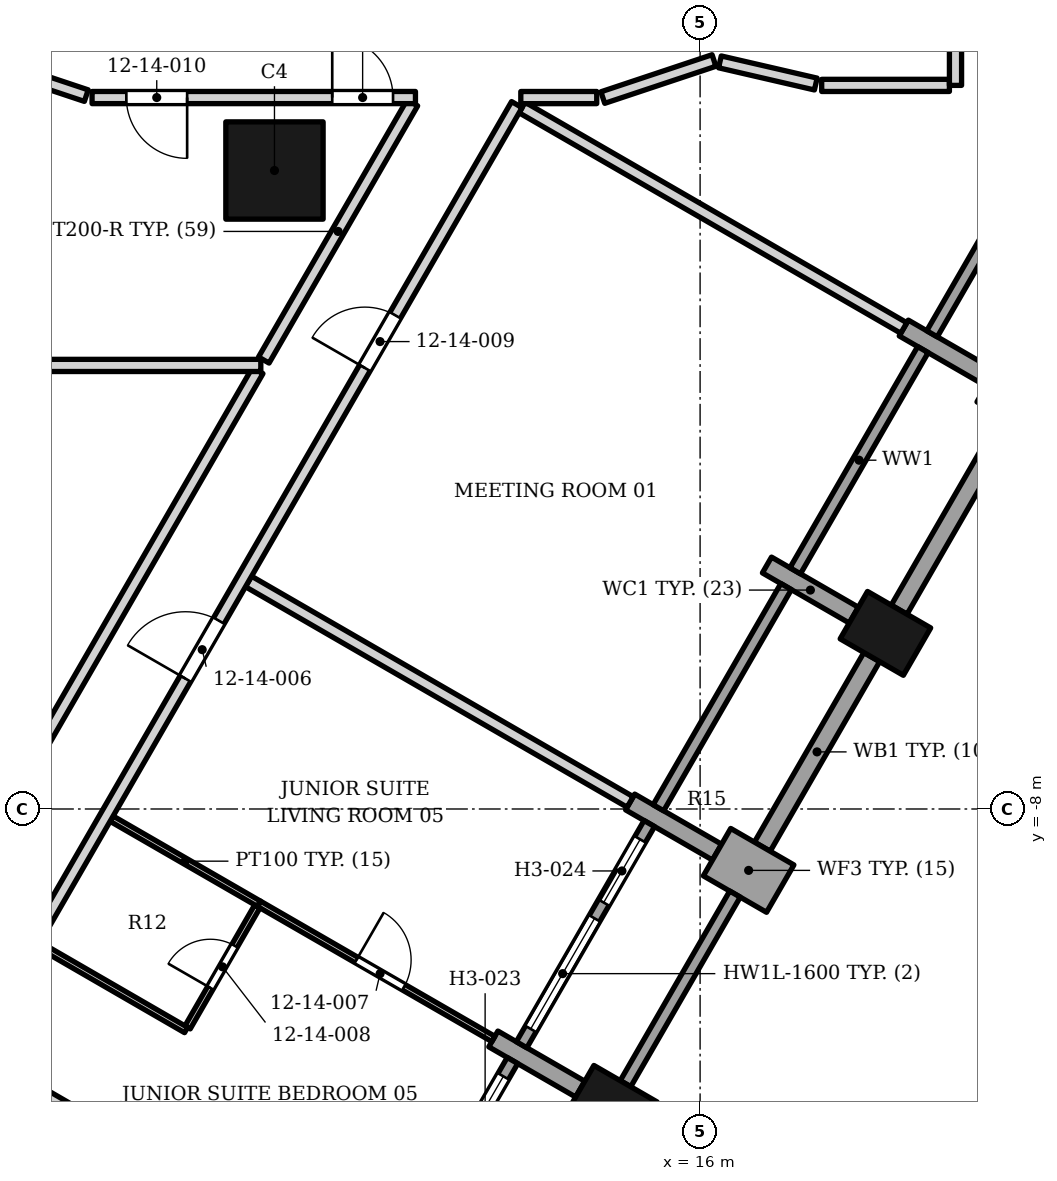
"""IFC4 building model, lengths in metres.
Left out: names, types, materials, properties, quantities, classifications, styles, units other than length and angle.
Written with IfcOpenShell. Run it as: python <this file> out.ifc"""

import sys

from ifc_helpers import new_model, si_unit, direction, frame, frame_2d, origin, origin_2d, place, context, subcontext, project, spatial, rectangle, extrude, element, fill, save


model = new_model("IFC4")
c1 = context("Model", 3, precision=1e-05, world=origin(), true_north=direction((0.0, 1.0)))
c2 = subcontext(c1, "Body", "Model", "MODEL_VIEW")
j1 = project(units=[si_unit("LENGTHUNIT", "METRE"), si_unit("PLANEANGLEUNIT", "RADIAN")], contexts=[c1])
p1 = place(None, origin())
s1 = spatial("IfcSite", under=j1, at=p1, CompositionType="ELEMENT")
p2 = place(p1, origin())
s2 = spatial("IfcBuilding", under=s1, at=p2, CompositionType="ELEMENT")
p3 = place(p2, frame((0.0, 0.0, 66.4)))
s3 = spatial("IfcBuildingStorey", under=s2, at=p3, CompositionType="ELEMENT", Elevation=66.4)
p4 = place(p3, frame((9.0, 2.5, 0.0), z_axis=(0.0, 0.0, 1.0), x_axis=(1.0, 0.0, 0.0)))
e1 = element("IfcColumn", 1, at=p4, inside=s3, PredefinedType="COLUMN", context=c2, shape_type="SweptSolid", body=[
    extrude(rectangle(XDim=1.6, YDim=1.6, at=origin_2d()), origin(), (0.0, 0.0, 1.0), 3.4),
])
for number, where, z_axis, x_axis in (
    (2, (14.548, -12.907, 0.0), (0.0, 0.0, 1.0), (0.5, 0.866, 0.0)),
    (3, (19.048, -5.112, 0.0), (0.0, 0.0, 1.0), (0.5, 0.866, 0.0)),
):
    element("IfcColumn", number, at=place(p3, frame(where, z_axis=z_axis, x_axis=x_axis)), inside=s3, PredefinedType="COLUMN", context=c2, shape_type="SweptSolid", body=[
        extrude(rectangle(XDim=0.9, YDim=1.2, at=origin_2d()), origin(), (0.0, 0.0, 1.0), 3.4),
    ])
p5 = place(p3, frame((14.029, -12.607, 0.0), z_axis=(0.0, 0.0, 1.0), x_axis=(-0.866003217194, 0.500038426333, 0.0)))
e4 = element("IfcWall", 4, at=p5, inside=s3, PredefinedType="SOLIDWALL", context=c2, shape_type="SweptSolid", body=[
    extrude(rectangle(XDim=1.65, YDim=0.3, at=frame_2d((0.825, 0.0))), origin(), (0.0, 0.0, 1.0), 2.302),
])
p6 = place(p3, frame((16.279, -8.709, 0.0), z_axis=(0.0, 0.0, 1.0), x_axis=(0.865955154139, -0.50012165622, 0.0)))
e5 = element("IfcWall", 5, at=p6, inside=s3, PredefinedType="SOLIDWALL", context=c2, shape_type="SweptSolid", body=[
    extrude(rectangle(XDim=1.2, YDim=0.9, at=frame_2d((0.6, 0.0))), origin(), (0.0, 0.0, 1.0), 2.63),
])
p7 = place(p3, frame((16.279, -8.709, 0.0), z_axis=(0.0, 0.0, 1.0), x_axis=(-0.866040211805, 0.499974350878, 0.0)))
e6 = element("IfcWall", 6, at=p7, inside=s3, PredefinedType="SOLIDWALL", context=c2, shape_type="SweptSolid", body=[
    extrude(rectangle(XDim=1.65, YDim=0.3, at=frame_2d((0.825, 0.0))), origin(), (0.0, 0.0, 1.0), 2.65),
])
p8 = place(p3, frame((17.1, -3.988, 0.0), z_axis=(0.0, 0.0, 1.0), x_axis=(0.866030301974, -0.499991515992, 0.0)))
e7 = element("IfcWall", 7, at=p8, inside=s3, PredefinedType="SOLIDWALL", context=c2, shape_type="SweptSolid", body=[
    extrude(rectangle(XDim=1.649, YDim=0.3, at=frame_2d((0.825, 0.0))), origin(), (0.0, 0.0, 1.0), 2.65),
])
p9 = place(p3, frame((21.818, -1.515, 0.0), z_axis=(0.0, 0.0, 1.0), x_axis=(-0.865955154139, 0.50012165622, 0.0)))
e8 = element("IfcWall", 8, at=p9, inside=s3, PredefinedType="SOLIDWALL", context=c2, shape_type="SweptSolid", body=[
    extrude(rectangle(XDim=1.2, YDim=0.9, at=frame_2d((0.6, 0.0))), origin(), (0.0, 0.0, 1.0), 2.63),
])
p10 = place(p3, frame((19.35, -0.09, 0.0), z_axis=(0.0, 0.0, 1.0), x_axis=(0.866040211805, -0.499974350878, 0.0)))
e9 = element("IfcWall", 9, at=p10, inside=s3, PredefinedType="SOLIDWALL", context=c2, shape_type="SweptSolid", body=[
    extrude(rectangle(XDim=1.65, YDim=0.3, at=frame_2d((0.825, 0.0))), origin(), (0.0, 0.0, 1.0), 2.65),
])
p11 = place(p3, frame((10.814, -15.774, 0.0), z_axis=(0.0, 0.0, 1.0), x_axis=(0.500002543286, 0.866023935413, 0.0)))
e10 = element("IfcWall", 10, at=p11, inside=s3, PredefinedType="ELEMENTEDWALL", context=c2, shape_type="SweptSolid", body=[
    extrude(rectangle(XDim=4.2, YDim=0.2, at=frame_2d((2.1, 0.0))), origin(), (0.0, 0.0, 1.0), 2.302),
])
p12 = place(p11, frame((0.3, 0.0, 0.6)))
e11 = element("IfcOpeningElement", 11, at=p12, cuts=e10, PredefinedType="OPENING", context=c2, shape_type="SweptSolid", body=[
    extrude(rectangle(XDim=2.1, YDim=1.6, at=frame_2d((1.05, 0.8))), frame((0.0, 0.11, 0.0), z_axis=(0.0, -1.0, 0.0), x_axis=(1.0, 0.0, 0.0)), (0.0, 0.0, 1.0), 0.22),
])
p13 = place(p11, frame((2.7, 0.0, 0.0)))
e12 = element("IfcOpeningElement", 12, at=p13, cuts=e10, PredefinedType="OPENING", context=c2, shape_type="SweptSolid", body=[
    extrude(rectangle(XDim=1.2, YDim=2.2, at=frame_2d((0.6, 1.1))), frame((0.0, 0.11, 0.0), z_axis=(0.0, -1.0, 0.0), x_axis=(1.0, 0.0, 0.0)), (0.0, 0.0, 1.0), 0.22),
])
p14 = place(p3, frame((14.773, -12.517, 0.0), z_axis=(0.0, 0.0, 1.0), x_axis=(0.499931829785, 0.866064758299, 0.0)))
e13 = element("IfcWall", 13, at=p14, inside=s3, PredefinedType="SOLIDWALL", context=c2, shape_type="SweptSolid", body=[
    extrude(rectangle(XDim=3.6, YDim=0.2, at=frame_2d((1.8, 0.0))), origin(), (0.0, 0.0, 1.0), 2.302),
])
p15 = place(p3, frame((13.064, -11.877, 0.0), z_axis=(0.0, 0.0, 1.0), x_axis=(0.500027713859, 0.866009402589, 0.0)))
e14 = element("IfcWall", 14, at=p15, inside=s3, PredefinedType="ELEMENTEDWALL", context=c2, shape_type="SweptSolid", body=[
    extrude(rectangle(XDim=4.2, YDim=0.2, at=frame_2d((2.1, 0.0))), origin(), (0.0, 0.0, 1.0), 2.302),
])
p16 = place(p15, frame((0.3, 0.0, 0.6)))
e15 = element("IfcOpeningElement", 15, at=p16, cuts=e14, PredefinedType="OPENING", context=c2, shape_type="SweptSolid", body=[
    extrude(rectangle(XDim=2.1, YDim=1.6, at=frame_2d((1.05, 0.8))), frame((0.0, 0.11, 0.0), z_axis=(0.0, -1.0, 0.0), x_axis=(1.0, 0.0, 0.0)), (0.0, 0.0, 1.0), 0.22),
])
p17 = place(p15, frame((2.7, 0.0, 0.0)))
e16 = element("IfcOpeningElement", 16, at=p17, cuts=e14, PredefinedType="OPENING", context=c2, shape_type="SweptSolid", body=[
    extrude(rectangle(XDim=1.2, YDim=2.2, at=frame_2d((0.6, 1.1))), frame((0.0, 0.11, 0.0), z_axis=(0.0, -1.0, 0.0), x_axis=(1.0, 0.0, 0.0)), (0.0, 0.0, 1.0), 0.22),
])
p18 = place(p3, frame((17.023, -8.62, 0.0), z_axis=(0.0, 0.0, 1.0), x_axis=(0.499961193289, 0.866047807691, 0.0)))
e17 = element("IfcWall", 17, at=p18, inside=s3, PredefinedType="SOLIDWALL", context=c2, shape_type="SweptSolid", body=[
    extrude(rectangle(XDim=3.6, YDim=0.3, at=frame_2d((1.8, 0.0))), origin(), (0.0, 0.0, 1.0), 2.63),
])
p19 = place(p3, frame((15.314, -7.98, 0.0), z_axis=(0.0, 0.0, 1.0), x_axis=(0.500002543286, 0.866023935413, 0.0)))
e18 = element("IfcWall", 18, at=p19, inside=s3, PredefinedType="ELEMENTEDWALL", context=c2, shape_type="SweptSolid", body=[
    extrude(rectangle(XDim=4.2, YDim=0.2, at=frame_2d((2.1, 0.0))), origin(), (0.0, 0.0, 1.0), 2.65),
])
p20 = place(p3, frame((19.273, -4.723, 0.0), z_axis=(0.0, 0.0, 1.0), x_axis=(0.499961193289, 0.866047807691, 0.0)))
e19 = element("IfcWall", 19, at=p20, inside=s3, PredefinedType="SOLIDWALL", context=c2, shape_type="SweptSolid", body=[
    extrude(rectangle(XDim=3.6, YDim=0.3, at=frame_2d((1.8, 0.0))), origin(), (0.0, 0.0, 1.0), 2.63),
])
p21 = place(p3, frame((17.564, -4.083, 0.0), z_axis=(0.0, 0.0, 1.0), x_axis=(0.500027713859, 0.866009402589, 0.0)))
e20 = element("IfcWall", 20, at=p21, inside=s3, PredefinedType="ELEMENTEDWALL", context=c2, shape_type="SweptSolid", body=[
    extrude(rectangle(XDim=4.2, YDim=0.2, at=frame_2d((2.1, 0.0))), origin(), (0.0, 0.0, 1.0), 2.65),
])
p22 = place(p3, frame((19.814, -0.186, 0.0), z_axis=(0.0, 0.0, 1.0), x_axis=(0.500002543286, 0.866023935413, 0.0)))
e21 = element("IfcWall", 21, at=p22, inside=s3, PredefinedType="ELEMENTEDWALL", context=c2, shape_type="SweptSolid", body=[
    extrude(rectangle(XDim=4.2, YDim=0.2, at=frame_2d((2.1, 0.0))), origin(), (0.0, 0.0, 1.0), 2.45),
])
p23 = place(p3, frame((4.072, -12.052, 0.0), z_axis=(0.0, 0.0, 1.0), x_axis=(0.865900080757, -0.500217003055, 0.0)))
e22 = element("IfcWall", 22, at=p23, inside=s3, PredefinedType="PARTITIONING", context=c2, shape_type="SweptSolid", body=[
    extrude(rectangle(XDim=7.25, YDim=0.2, at=frame_2d((3.625, 0.0))), origin(), (0.0, 0.0, 1.0), 2.302),
])
p24 = place(p3, frame((8.745, -9.559, 0.0), z_axis=(0.0, 0.0, 1.0), x_axis=(0.866220293694, -0.499662288743, 0.0)))
e23 = element("IfcWall", 23, at=p24, inside=s3, PredefinedType="PARTITIONING", context=c2, shape_type="SweptSolid", body=[
    extrude(rectangle(XDim=4.45, YDim=0.1, at=frame_2d((2.225, 0.0))), origin(), (0.0, 0.0, 1.0), 2.552),
])
p25 = place(p24, frame((1.85, 0.0, 0.0)))
e24 = element("IfcOpeningElement", 24, at=p25, cuts=e23, PredefinedType="OPENING", context=c2, shape_type="SweptSolid", body=[
    extrude(rectangle(XDim=0.9, YDim=2.1, at=frame_2d((0.45, 1.05))), frame((0.0, 0.06, 0.0), z_axis=(0.0, -1.0, 0.0), x_axis=(1.0, 0.0, 0.0)), (0.0, 0.0, 1.0), 0.12),
])
p26 = place(p3, frame((7.571, -11.592, 0.0), z_axis=(0.0, 0.0, 1.0), x_axis=(0.499418922955, 0.86636062895, 0.0)))
e25 = element("IfcWall", 25, at=p26, inside=s3, PredefinedType="PARTITIONING", context=c2, shape_type="SweptSolid", body=[
    extrude(rectangle(XDim=2.298, YDim=0.1, at=frame_2d((1.149, 0.0))), origin(), (0.0, 0.0, 1.0), 3.23),
])
p27 = place(p26, frame((0.75, 0.0, 0.0)))
e26 = element("IfcOpeningElement", 26, at=p27, cuts=e25, PredefinedType="OPENING", context=c2, shape_type="SweptSolid", body=[
    extrude(rectangle(XDim=0.8, YDim=2.1, at=frame_2d((0.4, 1.05))), frame((0.0, 0.06, 0.0), z_axis=(0.0, -1.0, 0.0), x_axis=(1.0, 0.0, 0.0)), (0.0, 0.0, 1.0), 0.12),
])
p28 = place(p3, frame((5.122, -10.234, 0.0), z_axis=(0.0, 0.0, 1.0), x_axis=(0.86575844616, -0.500462099367, 0.0)))
e27 = element("IfcWall", 27, at=p28, inside=s3, PredefinedType="PARTITIONING", context=c2, shape_type="SweptSolid", body=[
    extrude(rectangle(XDim=2.8, YDim=0.1, at=frame_2d((1.4, 0.0))), origin(), (0.0, 0.0, 1.0), 3.23),
])
p29 = place(p3, frame((6.32, -8.158, 0.0), z_axis=(0.0, 0.0, 1.0), x_axis=(0.865995230276, -0.500052258409, 0.0)))
e28 = element("IfcWall", 28, at=p29, inside=s3, PredefinedType="PARTITIONING", context=c2, shape_type="SweptSolid", body=[
    extrude(rectangle(XDim=2.798, YDim=0.1, at=frame_2d((1.399, 0.0))), origin(), (0.0, 0.0, 1.0), 3.23),
])
p30 = place(p3, frame((4.688, -7.782, 0.0), z_axis=(0.0, 0.0, 1.0), x_axis=(0.499996438971, 0.866027459735, 0.0)))
e29 = element("IfcWall", 29, at=p30, inside=s3, PredefinedType="PARTITIONING", context=c2, shape_type="SweptSolid", body=[
    extrude(rectangle(XDim=8.073, YDim=0.2, at=frame_2d((4.037, 0.0))), origin(), (0.0, 0.0, 1.0), 2.384),
])
p31 = place(p3, frame((8.572, -4.258, 0.0), z_axis=(0.0, 0.0, 1.0), x_axis=(0.865900080757, -0.500217003055, 0.0)))
e30 = element("IfcWall", 30, at=p31, inside=s3, PredefinedType="PARTITIONING", context=c2, shape_type="SweptSolid", body=[
    extrude(rectangle(XDim=7.25, YDim=0.2, at=frame_2d((3.625, 0.0))), origin(), (0.0, 0.0, 1.0), 2.384),
])
p32 = place(p3, frame((-8.737, -0.706, 0.0), z_axis=(0.0, 0.0, 1.0), x_axis=(1.0, 0.0, 0.0)))
e31 = element("IfcWall", 31, at=p32, inside=s3, PredefinedType="PARTITIONING", context=c2, shape_type="SweptSolid", body=[
    extrude(rectangle(XDim=17.512, YDim=0.2, at=frame_2d((8.756, 0.0))), origin(), (0.0, 0.0, 1.0), 2.384),
])
p33 = place(p3, frame((8.824, -0.617, 0.0), z_axis=(0.0, 0.0, 1.0), x_axis=(0.500271769931, 0.865868440475, 0.0)))
e32 = element("IfcWall", 32, at=p33, inside=s3, PredefinedType="PARTITIONING", context=c2, shape_type="SweptSolid", body=[
    extrude(rectangle(XDim=4.885, YDim=0.2, at=frame_2d((2.443, 0.0))), origin(), (0.0, 0.0, 1.0), 2.552),
])
p34 = place(p3, frame((13.073, 3.536, 0.0), z_axis=(0.0, 0.0, 1.0), x_axis=(0.865929252606, -0.500166501758, 0.0)))
e33 = element("IfcWall", 33, at=p34, inside=s3, PredefinedType="PARTITIONING", context=c2, shape_type="SweptSolid", body=[
    extrude(rectangle(XDim=7.25, YDim=0.2, at=frame_2d((3.625, 0.0))), origin(), (0.0, 0.0, 1.0), 2.384),
])
p35 = place(p3, frame((2.686, -14.257, 0.0), z_axis=(0.0, 0.0, 1.0), x_axis=(0.49998850195, 0.866032042085, 0.0)))
e34 = element("IfcWall", 34, at=p35, inside=s3, PredefinedType="PARTITIONING", context=c2, shape_type="SweptSolid", body=[
    extrude(rectangle(XDim=20.6, YDim=0.2, at=frame_2d((10.3, 0.0))), origin(), (0.0, 0.0, 1.0), 2.302),
])
p36 = place(p35, frame((9.7, 0.0, 0.0)))
e35 = element("IfcOpeningElement", 35, at=p36, cuts=e34, PredefinedType="OPENING", context=c2, shape_type="SweptSolid", body=[
    extrude(rectangle(XDim=1.1, YDim=2.1, at=frame_2d((0.55, 1.05))), frame((0.0, 0.11, 0.0), z_axis=(0.0, -1.0, 0.0), x_axis=(1.0, 0.0, 0.0)), (0.0, 0.0, 1.0), 0.22),
])
p37 = place(p35, frame((15.6, 0.0, 0.0)))
e36 = element("IfcOpeningElement", 36, at=p37, cuts=e34, PredefinedType="OPENING", context=c2, shape_type="SweptSolid", body=[
    extrude(rectangle(XDim=1.0, YDim=2.1, at=frame_2d((0.5, 1.05))), frame((0.0, 0.11, 0.0), z_axis=(0.0, -1.0, 0.0), x_axis=(1.0, 0.0, 0.0)), (0.0, 0.0, 1.0), 0.22),
])
p38 = place(p3, frame((6.0, 3.7, 0.0), z_axis=(0.0, 0.0, 1.0), x_axis=(1.0, 0.0, 0.0)))
e37 = element("IfcWall", 37, at=p38, inside=s3, PredefinedType="PARTITIONING", context=c2, shape_type="SweptSolid", body=[
    extrude(rectangle(XDim=5.319, YDim=0.2, at=frame_2d((2.659, 0.0))), origin(), (0.0, 0.0, 1.0), 2.832),
])
p39 = place(p38, frame((0.564, 0.0, 0.0)))
e38 = element("IfcOpeningElement", 38, at=p39, cuts=e37, PredefinedType="OPENING", context=c2, shape_type="SweptSolid", body=[
    extrude(rectangle(XDim=1.0, YDim=2.1, at=frame_2d((0.5, 1.05))), frame((0.0, 0.11, 0.0), z_axis=(0.0, -1.0, 0.0), x_axis=(1.0, 0.0, 0.0)), (0.0, 0.0, 1.0), 0.22),
])
p40 = place(p38, frame((3.95, 0.0, 0.0)))
e39 = element("IfcOpeningElement", 39, at=p40, cuts=e37, PredefinedType="OPENING", context=c2, shape_type="SweptSolid", body=[
    extrude(rectangle(XDim=1.0, YDim=2.1, at=frame_2d((0.5, 1.05))), frame((0.0, 0.11, 0.0), z_axis=(0.0, -1.0, 0.0), x_axis=(1.0, 0.0, 0.0)), (0.0, 0.0, 1.0), 0.22),
])
p41 = place(p3, frame((13.052, 3.699, 0.0), z_axis=(0.0, 0.0, 1.0), x_axis=(1.0, 0.0, 0.0)))
e40 = element("IfcWall", 40, at=p41, inside=s3, PredefinedType="PARTITIONING", context=c2, shape_type="SweptSolid", body=[
    extrude(rectangle(XDim=1.249, YDim=0.2, at=frame_2d((0.624, 0.0))), origin(), (0.0, 0.0, 1.0), 2.384),
])
p42 = place(p3, frame((4.042, 4.352, 0.0), z_axis=(0.0, 0.0, 1.0), x_axis=(0.948695731075, -0.316190464499, 0.0)))
e41 = element("IfcWall", 41, at=p42, inside=s3, PredefinedType="PARTITIONING", context=c2, shape_type="SweptSolid", body=[
    extrude(rectangle(XDim=1.964, YDim=0.2, at=frame_2d((0.982, 0.0))), origin(), (0.0, 0.0, 1.0), 2.384),
])
p43 = place(p3, frame((18.0, 3.899, 0.0), z_axis=(0.0, 0.0, 1.0), x_axis=(0.999999972977, 0.000232477037, 0.0)))
e42 = element("IfcWall", 42, at=p43, inside=s3, PredefinedType="PARTITIONING", context=c2, shape_type="SweptSolid", body=[
    extrude(rectangle(XDim=2.1, YDim=0.2, at=frame_2d((1.05, 0.0))), origin(), (0.0, 0.0, 1.0), 3.23),
])
p44 = place(p3, frame((16.326, 4.287, 0.0), z_axis=(0.0, 0.0, 1.0), x_axis=(0.974302124523, -0.225245133464, 0.0)))
e43 = element("IfcWall", 43, at=p44, inside=s3, PredefinedType="PARTITIONING", context=c2, shape_type="SweptSolid", body=[
    extrude(rectangle(XDim=1.618, YDim=0.2, at=frame_2d((0.809, 0.0))), origin(), (0.0, 0.0, 1.0), 2.45),
])
p45 = place(p3, frame((14.4, 3.699, 0.0), z_axis=(0.0, 0.0, 1.0), x_axis=(0.948657960303, 0.316303769112, 0.0)))
e44 = element("IfcWall", 44, at=p45, inside=s3, PredefinedType="PARTITIONING", context=c2, shape_type="SweptSolid", body=[
    extrude(rectangle(XDim=1.927, YDim=0.2, at=frame_2d((0.964, 0.0))), origin(), (0.0, 0.0, 1.0), 3.23),
])
p46 = place(p3, frame((20.2, 3.9, 0.0), z_axis=(0.0, 0.0, 1.0), x_axis=(0.0, 1.0, 0.0)))
e45 = element("IfcWall", 45, at=p46, inside=s3, PredefinedType="PARTITIONING", context=c2, shape_type="SweptSolid", body=[
    extrude(rectangle(XDim=2.353, YDim=0.2, at=frame_2d((1.176, 0.0))), origin(), (0.0, 0.0, 1.0), 2.45),
])
p47 = place(p13, origin())
e46 = element("IfcDoor", 46, at=p47, inside=s3, OperationType="SINGLE_SWING_LEFT", PredefinedType="DOOR", context=c2, shape_type="SweptSolid", body=[
    extrude(rectangle(XDim=1.2, YDim=2.2, at=frame_2d((0.6, 1.1))), frame((0.0, 0.025, 0.0), z_axis=(0.0, -1.0, 0.0), x_axis=(1.0, 0.0, 0.0)), (0.0, 0.0, 1.0), 0.05),
])
fill(e12, e46)
p48 = place(p16, origin())
e47 = element("IfcWindow", 47, at=p48, inside=s3, PartitioningType="SINGLE_PANEL", PredefinedType="WINDOW", context=c2, shape_type="SweptSolid", body=[
    extrude(rectangle(XDim=2.1, YDim=1.6, at=frame_2d((1.05, 0.8))), frame((0.0, 0.03, 0.0), z_axis=(0.0, -1.0, 0.0), x_axis=(1.0, 0.0, 0.0)), (0.0, 0.0, 1.0), 0.06),
])
fill(e15, e47)
p49 = place(p17, origin())
e48 = element("IfcDoor", 48, at=p49, inside=s3, OperationType="SINGLE_SWING_LEFT", PredefinedType="DOOR", context=c2, shape_type="SweptSolid", body=[
    extrude(rectangle(XDim=1.2, YDim=2.2, at=frame_2d((0.6, 1.1))), frame((0.0, 0.025, 0.0), z_axis=(0.0, -1.0, 0.0), x_axis=(1.0, 0.0, 0.0)), (0.0, 0.0, 1.0), 0.05),
])
fill(e16, e48)
p50 = place(p36, origin())
e49 = element("IfcDoor", 49, at=p50, inside=s3, OperationType="SINGLE_SWING_LEFT", PredefinedType="DOOR", context=c2, shape_type="SweptSolid", body=[
    extrude(rectangle(XDim=1.1, YDim=2.1, at=frame_2d((0.55, 1.05))), frame((0.0, 0.025, 0.0), z_axis=(0.0, -1.0, 0.0), x_axis=(1.0, 0.0, 0.0)), (0.0, 0.0, 1.0), 0.05),
])
fill(e35, e49)
p51 = place(p25, origin())
e50 = element("IfcDoor", 50, at=p51, inside=s3, OperationType="SINGLE_SWING_LEFT", PredefinedType="DOOR", context=c2, shape_type="SweptSolid", body=[
    extrude(rectangle(XDim=0.9, YDim=2.1, at=frame_2d((0.45, 1.05))), frame((0.0, 0.025, 0.0), z_axis=(0.0, -1.0, 0.0), x_axis=(1.0, 0.0, 0.0)), (0.0, 0.0, 1.0), 0.05),
])
fill(e24, e50)
p52 = place(p27, origin())
e51 = element("IfcDoor", 51, at=p52, inside=s3, OperationType="SINGLE_SWING_LEFT", PredefinedType="DOOR", context=c2, shape_type="SweptSolid", body=[
    extrude(rectangle(XDim=0.8, YDim=2.1, at=frame_2d((0.4, 1.05))), frame((0.0, 0.025, 0.0), z_axis=(0.0, -1.0, 0.0), x_axis=(1.0, 0.0, 0.0)), (0.0, 0.0, 1.0), 0.05),
])
fill(e26, e51)
p53 = place(p37, origin())
e52 = element("IfcDoor", 52, at=p53, inside=s3, OperationType="SINGLE_SWING_LEFT", PredefinedType="DOOR", context=c2, shape_type="SweptSolid", body=[
    extrude(rectangle(XDim=1.0, YDim=2.1, at=frame_2d((0.5, 1.05))), frame((0.0, 0.025, 0.0), z_axis=(0.0, -1.0, 0.0), x_axis=(1.0, 0.0, 0.0)), (0.0, 0.0, 1.0), 0.05),
])
fill(e36, e52)
p54 = place(p39, origin())
e53 = element("IfcDoor", 53, at=p54, inside=s3, OperationType="SINGLE_SWING_RIGHT", PredefinedType="DOOR", context=c2, shape_type="SweptSolid", body=[
    extrude(rectangle(XDim=1.0, YDim=2.1, at=frame_2d((0.5, 1.05))), frame((0.0, 0.025, 0.0), z_axis=(0.0, -1.0, 0.0), x_axis=(1.0, 0.0, 0.0)), (0.0, 0.0, 1.0), 0.05),
])
fill(e38, e53)
p55 = place(p40, origin())
e54 = element("IfcDoor", 54, at=p55, inside=s3, OperationType="SINGLE_SWING_LEFT", PredefinedType="DOOR", context=c2, shape_type="SweptSolid", body=[
    extrude(rectangle(XDim=1.0, YDim=2.1, at=frame_2d((0.5, 1.05))), frame((0.0, 0.025, 0.0), z_axis=(0.0, -1.0, 0.0), x_axis=(1.0, 0.0, 0.0)), (0.0, 0.0, 1.0), 0.05),
])
fill(e39, e54)
save(model, sys.argv[1])
